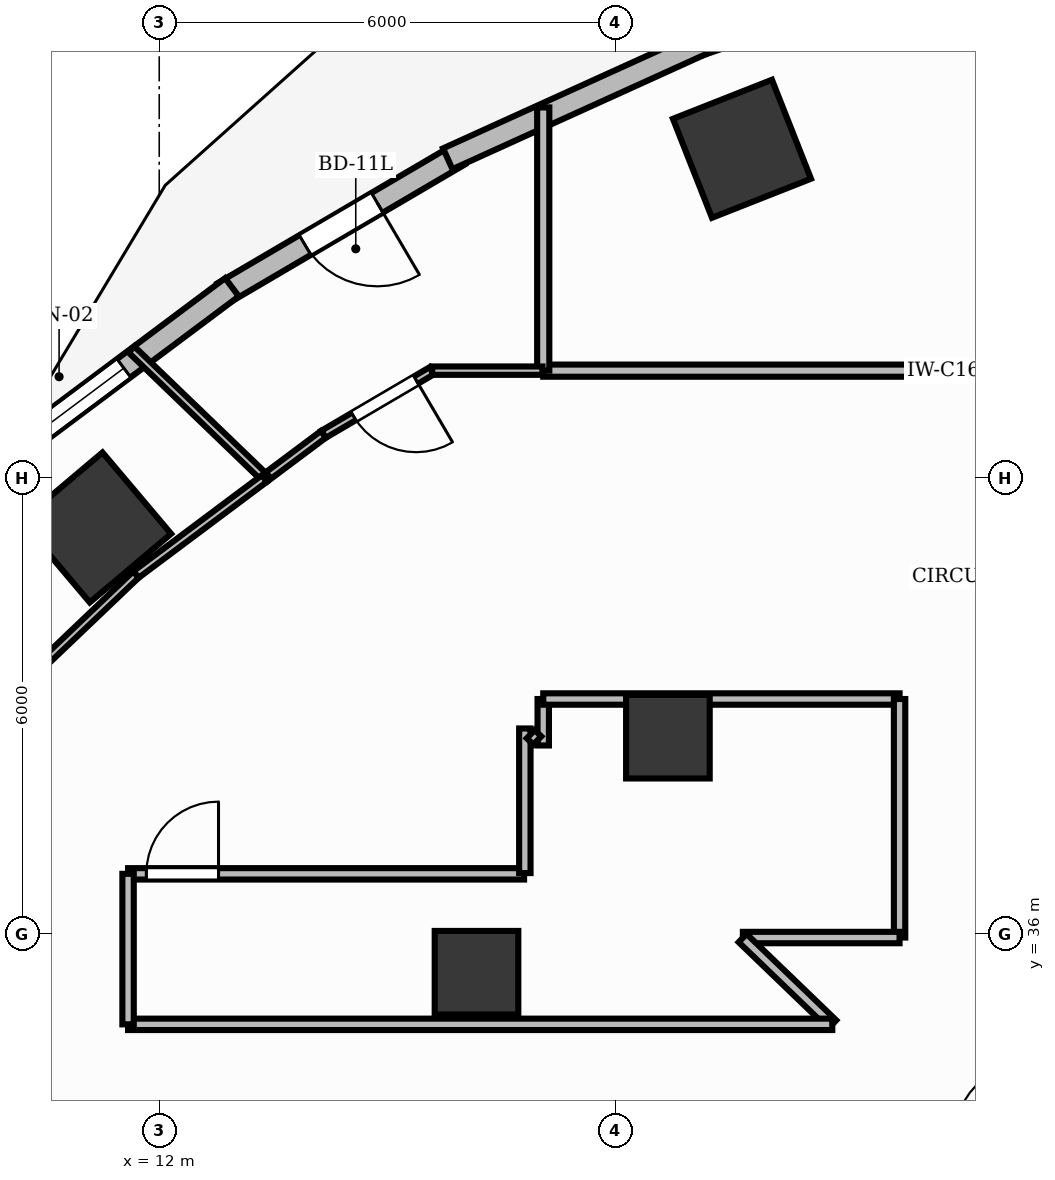
"""IFC4 building model, lengths in metres.
Left out: names, types, materials, properties, quantities, classifications, styles, units other than length and angle.
Written with IfcOpenShell. Run it as: python <this file> out.ifc"""

import sys

from ifc_helpers import new_model, si_unit, direction, frame, frame_2d, origin, origin_2d, place, context, subcontext, project, spatial, rectangle, extrude, element, fill, save


model = new_model("IFC4")
c1 = context("Model", 3, precision=1e-05, world=origin(), true_north=direction((0.0, 1.0)))
c2 = subcontext(c1, "Body", "Model", "MODEL_VIEW")
j1 = project(units=[si_unit("LENGTHUNIT", "METRE"), si_unit("PLANEANGLEUNIT", "RADIAN")], contexts=[c1])
p1 = place(None, origin())
s1 = spatial("IfcSite", under=j1, at=p1, CompositionType="ELEMENT")
p2 = place(p1, origin())
s2 = spatial("IfcBuilding", under=s1, at=p2, CompositionType="ELEMENT")
p3 = place(p2, frame((0.0, 0.0, 55.2)))
s3 = spatial("IfcBuildingStorey", under=s2, at=p3, CompositionType="ELEMENT", Elevation=55.2)
for number, where, z_axis, x_axis in (
    (1, (19.667, 46.329, -0.0), (0.0, 0.0, 1.0), (0.93, 0.367, 0.0)),
    (2, (11.17, 41.347, -0.0), (0.0, 0.0, 1.0), (0.764, 0.645, 0.0)),
):
    element("IfcColumn", number, at=place(p3, frame(where, z_axis=z_axis, x_axis=x_axis)), inside=s3, PredefinedType="COLUMN", context=c2, shape_type="SweptSolid", body=[
        extrude(rectangle(XDim=1.4, YDim=1.4, at=origin_2d()), origin(), (0.0, 0.0, 1.0), 3.901),
    ])
for number, where, z_axis, x_axis in (
    (3, (18.692, 38.595, -0.0), (0.0, 0.0, 1.0), (1.0, 0.0, 0.0)),
    (4, (16.174, 35.489, -0.0), (0.0, 0.0, 1.0), (1.0, 0.0, 0.0)),
):
    element("IfcColumn", number, at=place(p3, frame(where, z_axis=z_axis, x_axis=x_axis)), inside=s3, PredefinedType="COLUMN", context=c2, shape_type="SweptSolid", body=[
        extrude(rectangle(XDim=1.1, YDim=1.1, at=origin_2d()), origin(), (0.0, 0.0, 1.0), 3.901),
    ])
p4 = place(p3, frame((15.944, 46.25, 0.0), z_axis=(0.0, 0.0, 1.0), x_axis=(-0.862473134325, -0.506102847817, 0.0)))
e5 = element("IfcWall", 5, at=p4, inside=s3, PredefinedType="STANDARD", context=c2, shape_type="SweptSolid", body=[
    extrude(rectangle(XDim=3.595, YDim=0.3, at=frame_2d((1.798, 0.0))), origin(), (0.0, 0.0, 1.0), 3.9),
])
p5 = place(p4, frame((1.248, 0.0, 0.0)))
e6 = element("IfcOpeningElement", 6, at=p5, cuts=e5, PredefinedType="OPENING", context=c2, shape_type="SweptSolid", body=[
    extrude(rectangle(XDim=1.1, YDim=2.15, at=frame_2d((0.55, 1.075))), frame((0.0, 0.165, 0.0), z_axis=(0.0, -1.0, 0.0), x_axis=(1.0, 0.0, 0.0)), (0.0, 0.0, 1.0), 0.33),
])
p6 = place(p3, frame((12.957, 44.507, 0.0), z_axis=(0.0, 0.0, 1.0), x_axis=(-0.800798896088, -0.59893332519, 0.0)))
e7 = element("IfcWall", 7, at=p6, inside=s3, PredefinedType="STANDARD", context=c2, shape_type="SweptSolid", body=[
    extrude(rectangle(XDim=3.481, YDim=0.3, at=frame_2d((1.74, 0.0))), origin(), (0.0, 0.0, 1.0), 3.9),
])
p7 = place(p6, frame((1.777, 0.0, 0.95)))
e8 = element("IfcOpeningElement", 8, at=p7, cuts=e7, PredefinedType="OPENING", context=c2, shape_type="SweptSolid", body=[
    extrude(rectangle(XDim=1.5, YDim=1.8, at=frame_2d((0.75, 0.9))), frame((0.0, 0.165, 0.0), z_axis=(0.0, -1.0, 0.0), x_axis=(1.0, 0.0, 0.0)), (0.0, 0.0, 1.0), 0.33),
])
p8 = place(p3, frame((22.667, 48.909, 0.0), z_axis=(0.0, 0.0, 1.0), x_axis=(-0.94702579403, -0.321157508773, 0.0)))
e9 = element("IfcWall", 9, at=p8, inside=s3, PredefinedType="STANDARD", context=c2, shape_type="SweptSolid", body=[
    extrude(rectangle(XDim=3.83, YDim=0.3, at=frame_2d((1.915, 0.0))), origin(), (0.0, 0.0, 1.0), 3.9),
])
p9 = place(p3, frame((19.201, 47.743, 0.0), z_axis=(0.0, 0.0, 1.0), x_axis=(-0.910623406862, -0.413237233166, 0.0)))
e10 = element("IfcWall", 10, at=p9, inside=s3, PredefinedType="STANDARD", context=c2, shape_type="SweptSolid", body=[
    extrude(rectangle(XDim=3.74, YDim=0.3, at=frame_2d((1.87, 0.0))), origin(), (0.0, 0.0, 1.0), 3.9),
])
p10 = place(p3, frame((30.98, 43.41, 0.0), z_axis=(0.0, 0.0, 1.0), x_axis=(-1.0, 0.0, 0.0)))
e11 = element("IfcWall", 11, at=p10, inside=s3, PredefinedType="PARTITIONING", context=c2, shape_type="SweptSolid", body=[
    extrude(rectangle(XDim=13.928, YDim=0.16, at=frame_2d((6.964, 0.0))), origin(), (0.0, 0.0, 1.0), 2.91),
])
p11 = place(p10, frame((0.24, 0.0, 0.0)))
e12 = element("IfcOpeningElement", 12, at=p11, cuts=e11, PredefinedType="OPENING", context=c2, shape_type="SweptSolid", body=[
    extrude(rectangle(XDim=0.95, YDim=2.15, at=frame_2d((0.475, 1.075))), frame((0.0, 0.095, 0.0), z_axis=(0.0, -1.0, 0.0), x_axis=(1.0, 0.0, 0.0)), (0.0, 0.0, 1.0), 0.19),
])
p12 = place(p3, frame((15.586, 43.409, 0.0), z_axis=(0.0, 0.0, 1.0), x_axis=(-0.862446636904, -0.506148000582, 0.0)))
e13 = element("IfcWall", 13, at=p12, inside=s3, PredefinedType="MOVABLE", context=c2, shape_type="SweptSolid", body=[
    extrude(rectangle(XDim=1.652, YDim=0.11, at=frame_2d((0.826, 0.0))), origin(), (0.0, 0.0, 1.0), 2.91),
])
p13 = place(p12, frame((0.24, 0.0, 0.0)))
e14 = element("IfcOpeningElement", 14, at=p13, cuts=e13, PredefinedType="OPENING", context=c2, shape_type="SweptSolid", body=[
    extrude(rectangle(XDim=0.95, YDim=2.15, at=frame_2d((0.475, 1.075))), frame((0.0, 0.07, 0.0), z_axis=(0.0, -1.0, 0.0), x_axis=(1.0, 0.0, 0.0)), (0.0, 0.0, 1.0), 0.14),
])
p14 = place(p3, frame((11.59, 36.79, 0.0), z_axis=(0.0, 0.0, 1.0), x_axis=(1.0, 0.0, 0.0)))
e15 = element("IfcWall", 15, at=p14, inside=s3, PredefinedType="PARTITIONING", context=c2, shape_type="SweptSolid", body=[
    extrude(rectangle(XDim=5.21, YDim=0.15, at=frame_2d((2.605, 0.0))), origin(), (0.0, 0.0, 1.0), 2.91),
])
p15 = place(p14, frame((0.24, 0.0, 0.0)))
e16 = element("IfcOpeningElement", 16, at=p15, cuts=e15, PredefinedType="OPENING", context=c2, shape_type="SweptSolid", body=[
    extrude(rectangle(XDim=0.95, YDim=2.15, at=frame_2d((0.475, 1.075))), frame((0.0, 0.09, 0.0), z_axis=(0.0, -1.0, 0.0), x_axis=(1.0, 0.0, 0.0)), (0.0, 0.0, 1.0), 0.18),
])
p16 = place(p3, frame((17.052, 43.41, 0.0), z_axis=(0.0, 0.0, 1.0), x_axis=(0.0, 1.0, 0.0)))
e17 = element("IfcWall", 17, at=p16, inside=s3, PredefinedType="PARTITIONING", context=c2, shape_type="SweptSolid", body=[
    extrude(rectangle(XDim=3.463, YDim=0.16, at=frame_2d((1.731, 0.0))), origin(), (0.0, 0.0, 1.0), 2.91),
])
p17 = place(p3, frame((17.042, 43.41, 0.0), z_axis=(0.0, 0.0, 1.0), x_axis=(-1.0, 0.0, 0.0)))
e18 = element("IfcWall", 18, at=p17, inside=s3, PredefinedType="MOVABLE", context=c2, shape_type="SweptSolid", body=[
    extrude(rectangle(XDim=1.451, YDim=0.11, at=frame_2d((0.726, 0.0))), origin(), (0.0, 0.0, 1.0), 2.91),
])
p18 = place(p3, frame((14.16, 42.572, 0.0), z_axis=(0.0, 0.0, 1.0), x_axis=(-0.800793474552, -0.598940573942, 0.0)))
e19 = element("IfcWall", 19, at=p18, inside=s3, PredefinedType="MOVABLE", context=c2, shape_type="SweptSolid", body=[
    extrude(rectangle(XDim=0.959, YDim=0.11, at=frame_2d((0.479, 0.0))), origin(), (0.0, 0.0, 1.0), 2.91),
])
p19 = place(p3, frame((13.392, 41.997, 0.0), z_axis=(0.0, 0.0, 1.0), x_axis=(-0.720542500503, 0.693410776502, 0.0)))
e20 = element("IfcWall", 20, at=p19, inside=s3, PredefinedType="MOVABLE", context=c2, shape_type="SweptSolid", body=[
    extrude(rectangle(XDim=2.438, YDim=0.11, at=frame_2d((1.219, 0.0))), origin(), (0.0, 0.0, 1.0), 2.91),
])
p20 = place(p3, frame((17.052, 38.479, 0.0), z_axis=(0.0, 0.0, 1.0), x_axis=(0.0, 1.0, 0.0)))
e21 = element("IfcWall", 21, at=p20, inside=s3, PredefinedType="PARTITIONING", context=c2, shape_type="SweptSolid", body=[
    extrude(rectangle(XDim=0.611, YDim=0.15, at=frame_2d((0.306, 0.0))), origin(), (0.0, 0.0, 1.0), 2.91),
])
p21 = place(p3, frame((17.052, 39.09, 0.0), z_axis=(0.0, 0.0, 1.0), x_axis=(1.0, 0.0, 0.0)))
e22 = element("IfcWall", 22, at=p21, inside=s3, PredefinedType="PARTITIONING", context=c2, shape_type="SweptSolid", body=[
    extrude(rectangle(XDim=4.688, YDim=0.15, at=frame_2d((2.344, 0.0))), origin(), (0.0, 0.0, 1.0), 2.91),
])
p22 = place(p3, frame((21.74, 39.09, 0.0), z_axis=(0.0, 0.0, 1.0), x_axis=(0.0, -1.0, 0.0)))
e23 = element("IfcWall", 23, at=p22, inside=s3, PredefinedType="PARTITIONING", context=c2, shape_type="SweptSolid", body=[
    extrude(rectangle(XDim=3.138, YDim=0.15, at=frame_2d((1.569, 0.0))), origin(), (0.0, 0.0, 1.0), 2.91),
])
p23 = place(p3, frame((21.74, 35.952, 0.0), z_axis=(0.0, 0.0, 1.0), x_axis=(-1.0, 0.0, 0.0)))
e24 = element("IfcWall", 24, at=p23, inside=s3, PredefinedType="PARTITIONING", context=c2, shape_type="SweptSolid", body=[
    extrude(rectangle(XDim=2.062, YDim=0.15, at=frame_2d((1.031, 0.0))), origin(), (0.0, 0.0, 1.0), 2.91),
])
p24 = place(p3, frame((19.675, 35.945, 0.0), z_axis=(0.0, 0.0, 1.0), x_axis=(0.720620963524, -0.693329234152, 0.0)))
e25 = element("IfcWall", 25, at=p24, inside=s3, PredefinedType="PARTITIONING", context=c2, shape_type="SweptSolid", body=[
    extrude(rectangle(XDim=1.637, YDim=0.15, at=frame_2d((0.818, 0.0))), origin(), (0.0, 0.0, 1.0), 2.91),
])
p25 = place(p3, frame((20.855, 34.81, 0.0), z_axis=(0.0, 0.0, 1.0), x_axis=(-1.0, 0.0, 0.0)))
e26 = element("IfcWall", 26, at=p25, inside=s3, PredefinedType="PARTITIONING", context=c2, shape_type="SweptSolid", body=[
    extrude(rectangle(XDim=9.265, YDim=0.15, at=frame_2d((4.632, 0.0))), origin(), (0.0, 0.0, 1.0), 2.91),
])
p26 = place(p3, frame((11.59, 34.81, 0.0), z_axis=(0.0, 0.0, 1.0), x_axis=(0.0, 1.0, 0.0)))
e27 = element("IfcWall", 27, at=p26, inside=s3, PredefinedType="PARTITIONING", context=c2, shape_type="SweptSolid", body=[
    extrude(rectangle(XDim=1.98, YDim=0.15, at=frame_2d((0.99, 0.0))), origin(), (0.0, 0.0, 1.0), 2.91),
])
p27 = place(p3, frame((16.81, 36.8, 0.0), z_axis=(0.0, 0.0, 1.0), x_axis=(0.0, 1.0, 0.0)))
e28 = element("IfcWall", 28, at=p27, inside=s3, PredefinedType="PARTITIONING", context=c2, shape_type="SweptSolid", body=[
    extrude(rectangle(XDim=1.902, YDim=0.15, at=frame_2d((0.951, 0.0))), origin(), (0.0, 0.0, 1.0), 2.91),
])
p28 = place(p3, frame((16.888, 38.627, 0.0), z_axis=(0.0, 0.0, 1.0), x_axis=(0.721264817237, -0.692659413721, 0.0)))
e29 = element("IfcWall", 29, at=p28, inside=s3, PredefinedType="PARTITIONING", context=c2, shape_type="SweptSolid", body=[
    extrude(rectangle(XDim=0.119, YDim=0.15, at=frame_2d((0.06, 0.0))), origin(), (0.0, 0.0, 1.0), 2.91),
])
p29 = place(p3, frame((13.384, 41.991, 0.0), z_axis=(0.0, 0.0, 1.0), x_axis=(-0.800776961214, -0.598962651914, 0.0)))
e30 = element("IfcWall", 30, at=p29, inside=s3, PredefinedType="MOVABLE", context=c2, shape_type="SweptSolid", body=[
    extrude(rectangle(XDim=2.11, YDim=0.11, at=frame_2d((1.055, 0.0))), origin(), (0.0, 0.0, 1.0), 2.91),
])
p30 = place(p3, frame((11.693, 40.727, 0.0), z_axis=(0.0, 0.0, 1.0), x_axis=(-0.723683526017, -0.690131983154, 0.0)))
e31 = element("IfcWall", 31, at=p30, inside=s3, PredefinedType="MOVABLE", context=c2, shape_type="SweptSolid", body=[
    extrude(rectangle(XDim=2.94, YDim=0.11, at=frame_2d((1.47, 0.0))), origin(), (0.0, 0.0, 1.0), 2.91),
])
p31 = place(p5, origin())
e32 = element("IfcDoor", 32, at=p31, inside=s3, OperationType="SINGLE_SWING_LEFT", PredefinedType="DOOR", context=c2, shape_type="SweptSolid", body=[
    extrude(rectangle(XDim=1.1, YDim=2.15, at=frame_2d((0.55, 1.075))), frame((0.0, 0.025, 0.0), z_axis=(0.0, -1.0, 0.0), x_axis=(1.0, 0.0, 0.0)), (0.0, 0.0, 1.0), 0.05),
])
fill(e6, e32)
p32 = place(p7, origin())
e33 = element("IfcWindow", 33, at=p32, inside=s3, PartitioningType="DOUBLE_PANEL_VERTICAL", PredefinedType="WINDOW", context=c2, shape_type="SweptSolid", body=[
    extrude(rectangle(XDim=1.5, YDim=1.8, at=frame_2d((0.75, 0.9))), frame((0.0, 0.03, 0.0), z_axis=(0.0, -1.0, 0.0), x_axis=(1.0, 0.0, 0.0)), (0.0, 0.0, 1.0), 0.06),
])
fill(e8, e33)
p33 = place(p13, origin())
e34 = element("IfcDoor", 34, at=p33, inside=s3, OperationType="SINGLE_SWING_LEFT", PredefinedType="DOOR", context=c2, shape_type="SweptSolid", body=[
    extrude(rectangle(XDim=0.95, YDim=2.15, at=frame_2d((0.475, 1.075))), frame((0.0, 0.025, 0.0), z_axis=(0.0, -1.0, 0.0), x_axis=(1.0, 0.0, 0.0)), (0.0, 0.0, 1.0), 0.05),
])
fill(e14, e34)
p34 = place(p15, origin())
e35 = element("IfcDoor", 35, at=p34, inside=s3, OperationType="SINGLE_SWING_RIGHT", PredefinedType="DOOR", context=c2, shape_type="SweptSolid", body=[
    extrude(rectangle(XDim=0.95, YDim=2.15, at=frame_2d((0.475, 1.075))), frame((0.0, 0.025, 0.0), z_axis=(0.0, -1.0, 0.0), x_axis=(1.0, 0.0, 0.0)), (0.0, 0.0, 1.0), 0.05),
])
fill(e16, e35)
save(model, sys.argv[1])
